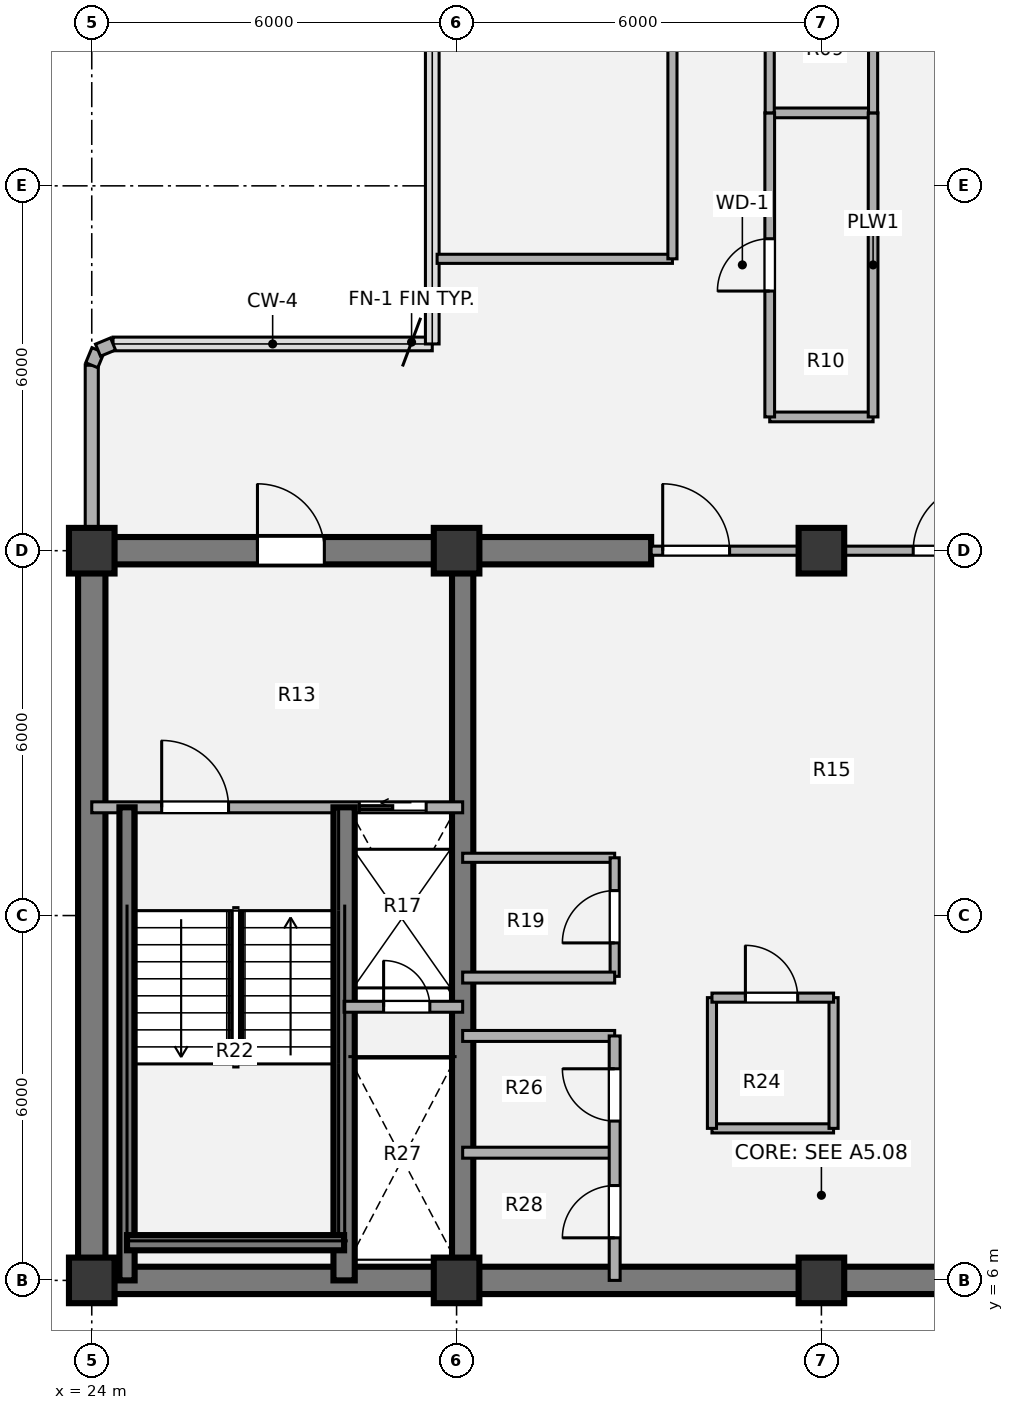
"""IFC4 building model, lengths in metres.
Left out: names, types, materials, properties, quantities, classifications, styles, units other than length and angle.
Written with IfcOpenShell. Run it as: python <this file> out.ifc"""

import sys

from ifc_helpers import new_model, si_unit, direction, frame, frame_2d, origin, origin_2d, place, context, subcontext, project, spatial, rectangle, extrude, source, transform, mapped, element, fill, save


model = new_model("IFC4")
c1 = context("Model", 3, precision=1e-05, world=origin(), true_north=direction((0.0, 1.0)))
c2 = subcontext(c1, "Body", "Model", "MODEL_VIEW")
j1 = project(units=[si_unit("LENGTHUNIT", "METRE"), si_unit("PLANEANGLEUNIT", "RADIAN")], contexts=[c1])
p1 = place(None, origin())
s1 = spatial("IfcSite", under=j1, at=p1, CompositionType="ELEMENT")
p2 = place(p1, origin())
s2 = spatial("IfcBuilding", under=s1, at=p2, CompositionType="ELEMENT")
p3 = place(p2, frame((0.0, 0.0, 190.44)))
s3 = spatial("IfcBuildingStorey", under=s2, at=p3, CompositionType="ELEMENT", Elevation=190.44)
m1 = source(origin(), c2, "Body", "SweptSolid", [
    extrude(rectangle(XDim=0.75, YDim=0.75, at=origin_2d()), origin(), (0.0, 0.0, 1.0), 3.78),
])
for number, where, z_axis, x_axis in (
    (1, (24.0, 6.0, 0.0), (0.0, 0.0, 1.0), (1.0, 0.0, 0.0)),
    (2, (30.0, 6.0, 0.0), (0.0, 0.0, 1.0), (1.0, 0.0, 0.0)),
    (3, (36.0, 6.0, 0.0), (0.0, 0.0, 1.0), (1.0, 0.0, 0.0)),
    (4, (24.0, 18.0, 0.0), (0.0, 0.0, 1.0), (1.0, 0.0, 0.0)),
    (5, (30.0, 18.0, 0.0), (0.0, 0.0, 1.0), (1.0, 0.0, 0.0)),
    (6, (36.0, 18.0, 0.0), (0.0, 0.0, 1.0), (1.0, 0.0, 0.0)),
):
    element("IfcColumn", number, at=place(p3, frame(where, z_axis=z_axis, x_axis=x_axis)), inside=s3, PredefinedType="COLUMN", context=c2, shape_type="MappedRepresentation", body=[
        mapped(m1, transform((0.0, 0.0, 0.0), x_axis=(1.0, 0.0, 0.0), y_axis=(0.0, 1.0, 0.0), z_axis=(0.0, 0.0, 1.0), scale=1.0)),
    ])
p4 = place(p3, frame((48.225, 6.0, 0.0), z_axis=(0.0, 0.0, 1.0), x_axis=(-1.0, 0.0, 0.0)))
e7 = element("IfcWall", 7, at=p4, inside=s3, PredefinedType="SHEAR", context=c2, shape_type="SweptSolid", body=[
    extrude(rectangle(XDim=24.45, YDim=0.45, at=frame_2d((12.225, 0.0))), origin(), (0.0, 0.0, 1.0), 3.78),
])
p5 = place(p3, frame((24.0, 6.0, 0.0), z_axis=(0.0, 0.0, 1.0), x_axis=(0.0, 1.0, 0.0)))
e8 = element("IfcWall", 8, at=p5, inside=s3, PredefinedType="SHEAR", context=c2, shape_type="SweptSolid", body=[
    extrude(rectangle(XDim=12.0, YDim=0.45, at=frame_2d((6.0, 0.0))), origin(), (0.0, 0.0, 1.0), 3.78),
])
p6 = place(p3, frame((23.775, 18.0, 0.0), z_axis=(0.0, 0.0, 1.0), x_axis=(1.0, 0.0, 0.0)))
e9 = element("IfcWall", 9, at=p6, inside=s3, PredefinedType="SHEAR", context=c2, shape_type="SweptSolid", body=[
    extrude(rectangle(XDim=9.425, YDim=0.45, at=frame_2d((4.712, 0.0))), origin(), (0.0, 0.0, 1.0), 3.78),
])
p7 = place(p6, frame((2.95, 0.0, 0.0)))
e10 = element("IfcOpeningElement", 10, at=p7, cuts=e9, PredefinedType="OPENING", context=c2, shape_type="SweptSolid", body=[
    extrude(rectangle(XDim=1.1, YDim=2.1, at=origin_2d()), frame((0.55, 0.235, 1.05), z_axis=(0.0, -1.0, 0.0), x_axis=(1.0, 0.0, 0.0)), (0.0, 0.0, 1.0), 0.47),
])
p8 = place(p3, frame((30.1, 6.0, 0.0), z_axis=(0.0, 0.0, 1.0), x_axis=(0.0, 1.0, 0.0)))
e11 = element("IfcWall", 11, at=p8, inside=s3, PredefinedType="SHEAR", context=c2, shape_type="SweptSolid", body=[
    extrude(rectangle(XDim=12.0, YDim=0.35, at=frame_2d((6.0, 0.0))), origin(), (0.0, 0.0, 1.0), 3.78),
])
p9 = place(p3, frame((24.0, 18.355, 0.0), z_axis=(0.0, 0.0, 1.0), x_axis=(0.0, 1.0, 0.0)))
e12 = element("IfcWall", 12, at=p9, inside=s3, PredefinedType="SOLIDWALL", context=c2, shape_type="SweptSolid", body=[
    extrude(rectangle(XDim=2.695, YDim=0.215, at=frame_2d((1.348, 0.0))), origin(), (0.0, 0.0, 1.0), 2.718),
])
p10 = place(p3, frame((24.0, 21.05, 0.0), z_axis=(0.0, 0.0, 1.0), x_axis=(0.382673670509, 0.923883575944, 0.0)))
e13 = element("IfcWall", 13, at=p10, inside=s3, PredefinedType="SOLIDWALL", context=c2, shape_type="SweptSolid", body=[
    extrude(rectangle(XDim=0.268, YDim=0.215, at=frame_2d((0.134, 0.0))), origin(), (0.0, 0.0, 1.0), 3.53),
])
p11 = place(p3, frame((24.103, 21.298, 0.0), z_axis=(0.0, 0.0, 1.0), x_axis=(0.924205486139, 0.381895560841, 0.0)))
e14 = element("IfcWall", 14, at=p11, inside=s3, PredefinedType="SOLIDWALL", context=c2, shape_type="SweptSolid", body=[
    extrude(rectangle(XDim=0.268, YDim=0.215, at=frame_2d((0.134, 0.0))), origin(), (0.0, 0.0, 1.0), 3.53),
])
p12 = place(p3, frame((30.1, 12.95, 0.0), z_axis=(0.0, 0.0, 1.0), x_axis=(1.0, 0.0, 0.0)))
e15 = element("IfcWall", 15, at=p12, inside=s3, PredefinedType="PARTITIONING", context=c2, shape_type="SweptSolid", body=[
    extrude(rectangle(XDim=2.5, YDim=0.15, at=frame_2d((1.25, 0.0))), origin(), (0.0, 0.0, 1.0), 3.5),
])
p13 = place(p3, frame((32.6, 11.0, 0.0), z_axis=(0.0, 0.0, 1.0), x_axis=(0.0, 1.0, 0.0)))
e16 = element("IfcWall", 16, at=p13, inside=s3, PredefinedType="PARTITIONING", context=c2, shape_type="SweptSolid", body=[
    extrude(rectangle(XDim=1.95, YDim=0.15, at=frame_2d((0.975, 0.0))), origin(), (0.0, 0.0, 1.0), 3.5),
])
p14 = place(p13, frame((0.55, 0.0, 0.0)))
e17 = element("IfcOpeningElement", 17, at=p14, cuts=e16, PredefinedType="OPENING", context=c2, shape_type="SweptSolid", body=[
    extrude(rectangle(XDim=0.86, YDim=2.1, at=origin_2d()), frame((0.43, 0.085, 1.05), z_axis=(0.0, -1.0, 0.0), x_axis=(1.0, 0.0, 0.0)), (0.0, 0.0, 1.0), 0.17),
])
p15 = place(p3, frame((34.2, 8.5, 0.0), z_axis=(0.0, 0.0, 1.0), x_axis=(1.0, 0.0, 0.0)))
e18 = element("IfcWall", 18, at=p15, inside=s3, PredefinedType="PARTITIONING", context=c2, shape_type="SweptSolid", body=[
    extrude(rectangle(XDim=2.0, YDim=0.15, at=frame_2d((1.0, 0.0))), origin(), (0.0, 0.0, 1.0), 3.5),
])
p16 = place(p3, frame((34.2, 8.5, 0.0), z_axis=(0.0, 0.0, 1.0), x_axis=(0.0, 1.0, 0.0)))
e19 = element("IfcWall", 19, at=p16, inside=s3, PredefinedType="PARTITIONING", context=c2, shape_type="SweptSolid", body=[
    extrude(rectangle(XDim=2.15, YDim=0.15, at=frame_2d((1.075, 0.0))), origin(), (0.0, 0.0, 1.0), 3.5),
])
p17 = place(p3, frame((36.2, 8.5, 0.0), z_axis=(0.0, 0.0, 1.0), x_axis=(0.0, 1.0, 0.0)))
e20 = element("IfcWall", 20, at=p17, inside=s3, PredefinedType="PARTITIONING", context=c2, shape_type="SweptSolid", body=[
    extrude(rectangle(XDim=2.15, YDim=0.15, at=frame_2d((1.075, 0.0))), origin(), (0.0, 0.0, 1.0), 2.715),
])
p18 = place(p3, frame((34.2, 10.65, 0.0), z_axis=(0.0, 0.0, 1.0), x_axis=(1.0, 0.0, 0.0)))
e21 = element("IfcWall", 21, at=p18, inside=s3, PredefinedType="PARTITIONING", context=c2, shape_type="SweptSolid", body=[
    extrude(rectangle(XDim=2.0, YDim=0.15, at=frame_2d((1.0, 0.0))), origin(), (0.0, 0.0, 1.0), 3.5),
])
p19 = place(p18, frame((0.55, 0.0, 0.0)))
e22 = element("IfcOpeningElement", 22, at=p19, cuts=e21, PredefinedType="OPENING", context=c2, shape_type="SweptSolid", body=[
    extrude(rectangle(XDim=0.86, YDim=2.1, at=origin_2d()), frame((0.43, 0.085, 1.05), z_axis=(0.0, -1.0, 0.0), x_axis=(1.0, 0.0, 0.0)), (0.0, 0.0, 1.0), 0.17),
])
for number, where, z_axis, x_axis in (
    (23, (30.1, 10.98, 0.0), (0.0, 0.0, 1.0), (1.0, 0.0, 0.0)),
    (24, (30.1, 8.1, 0.0), (0.0, 0.0, 1.0), (1.0, 0.0, 0.0)),
    (25, (30.1, 10.02, 0.0), (0.0, 0.0, 1.0), (1.0, 0.0, 0.0)),
):
    element("IfcWall", number, at=place(p3, frame(where, z_axis=z_axis, x_axis=x_axis)), inside=s3, PredefinedType="PARTITIONING", context=c2, shape_type="SweptSolid", body=[
        extrude(rectangle(XDim=2.5, YDim=0.18, at=frame_2d((1.25, 0.0))), origin(), (0.0, 0.0, 1.0), 3.5),
    ])
p20 = place(p3, frame((32.6, 6.0, 0.0), z_axis=(0.0, 0.0, 1.0), x_axis=(0.0, 1.0, 0.0)))
e26 = element("IfcWall", 26, at=p20, inside=s3, PredefinedType="PARTITIONING", context=c2, shape_type="SweptSolid", body=[
    extrude(rectangle(XDim=4.02, YDim=0.18, at=frame_2d((2.01, 0.0))), origin(), (0.0, 0.0, 1.0), 3.5),
])
p21 = place(p20, frame((0.7, 0.0, 0.0)))
e27 = element("IfcOpeningElement", 27, at=p21, cuts=e26, PredefinedType="OPENING", context=c2, shape_type="SweptSolid", body=[
    extrude(rectangle(XDim=0.86, YDim=2.1, at=origin_2d()), frame((0.43, 0.1, 1.05), z_axis=(0.0, -1.0, 0.0), x_axis=(1.0, 0.0, 0.0)), (0.0, 0.0, 1.0), 0.2),
])
p22 = place(p20, frame((2.62, 0.0, 0.0)))
e28 = element("IfcOpeningElement", 28, at=p22, cuts=e26, PredefinedType="OPENING", context=c2, shape_type="SweptSolid", body=[
    extrude(rectangle(XDim=0.86, YDim=2.1, at=origin_2d()), frame((0.43, 0.1, 1.05), z_axis=(0.0, -1.0, 0.0), x_axis=(1.0, 0.0, 0.0)), (0.0, 0.0, 1.0), 0.2),
])
p23 = place(p3, frame((33.2, 18.0, 0.0), z_axis=(0.0, 0.0, 1.0), x_axis=(1.0, 0.0, 0.0)))
e29 = element("IfcWall", 29, at=p23, inside=s3, PredefinedType="PARTITIONING", context=c2, shape_type="SweptSolid", body=[
    extrude(rectangle(XDim=5.6, YDim=0.15, at=frame_2d((2.8, 0.0))), origin(), (0.0, 0.0, 1.0), 2.515),
])
p24 = place(p23, frame((0.19, 0.0, 0.0)))
e30 = element("IfcOpeningElement", 30, at=p24, cuts=e29, PredefinedType="OPENING", context=c2, shape_type="SweptSolid", body=[
    extrude(rectangle(XDim=1.1, YDim=2.1, at=origin_2d()), frame((0.55, 0.085, 1.05), z_axis=(0.0, -1.0, 0.0), x_axis=(1.0, 0.0, 0.0)), (0.0, 0.0, 1.0), 0.17),
])
p25 = place(p23, frame((4.31, 0.0, 0.0)))
e31 = element("IfcOpeningElement", 31, at=p25, cuts=e29, PredefinedType="OPENING", context=c2, shape_type="SweptSolid", body=[
    extrude(rectangle(XDim=1.1, YDim=2.1, at=origin_2d()), frame((0.55, 0.085, 1.05), z_axis=(0.0, -1.0, 0.0), x_axis=(1.0, 0.0, 0.0)), (0.0, 0.0, 1.0), 0.17),
])
p26 = place(p3, frame((24.0, 13.78, 0.0), z_axis=(0.0, 0.0, 1.0), x_axis=(1.0, 0.0, 0.0)))
e32 = element("IfcWall", 32, at=p26, inside=s3, PredefinedType="PARTITIONING", context=c2, shape_type="SweptSolid", body=[
    extrude(rectangle(XDim=6.1, YDim=0.18, at=frame_2d((3.05, 0.0))), origin(), (0.0, 0.0, 1.0), 3.5),
])
p27 = place(p26, frame((1.15, 0.0, 0.0)))
e33 = element("IfcOpeningElement", 33, at=p27, cuts=e32, PredefinedType="OPENING", context=c2, shape_type="SweptSolid", body=[
    extrude(rectangle(XDim=1.1, YDim=2.1, at=origin_2d()), frame((0.55, 0.1, 1.05), z_axis=(0.0, -1.0, 0.0), x_axis=(1.0, 0.0, 0.0)), (0.0, 0.0, 1.0), 0.2),
])
p28 = place(p26, frame((4.4, 0.0, 0.0)))
e34 = element("IfcOpeningElement", 34, at=p28, cuts=e32, PredefinedType="OPENING", context=c2, shape_type="SweptSolid", body=[
    extrude(rectangle(XDim=1.1, YDim=2.1, at=origin_2d()), frame((0.55, 0.1, 1.05), z_axis=(0.0, -1.0, 0.0), x_axis=(1.0, 0.0, 0.0)), (0.0, 0.0, 1.0), 0.2),
])
p29 = place(p3, frame((28.15, 6.0, 0.0), z_axis=(0.0, 0.0, 1.0), x_axis=(0.0, 1.0, 0.0)))
e35 = element("IfcWall", 35, at=p29, inside=s3, PredefinedType="SHEAR", context=c2, shape_type="SweptSolid", body=[
    extrude(rectangle(XDim=7.78, YDim=0.35, at=frame_2d((3.89, 0.0))), origin(), (0.0, 0.0, 1.0), 3.85),
])
p30 = place(p3, frame((24.58, 6.0, 0.0), z_axis=(0.0, 0.0, 1.0), x_axis=(0.0, 1.0, 0.0)))
e36 = element("IfcWall", 36, at=p30, inside=s3, PredefinedType="SHEAR", context=c2, shape_type="SweptSolid", body=[
    extrude(rectangle(XDim=7.78, YDim=0.25, at=frame_2d((3.89, 0.0))), origin(), (0.0, 0.0, 1.0), 3.85),
])
p31 = place(p3, frame((24.58, 6.62, 0.0), z_axis=(0.0, 0.0, 1.0), x_axis=(1.0, 0.0, 0.0)))
e37 = element("IfcWall", 37, at=p31, inside=s3, PredefinedType="SHEAR", context=c2, shape_type="SweptSolid", body=[
    extrude(rectangle(XDim=3.57, YDim=0.25, at=frame_2d((1.785, 0.0))), origin(), (0.0, 0.0, 1.0), 3.85),
])
p32 = place(p3, frame((28.15, 10.5, 0.0), z_axis=(0.0, 0.0, 1.0), x_axis=(1.0, 0.0, 0.0)))
e38 = element("IfcWall", 38, at=p32, inside=s3, PredefinedType="PARTITIONING", context=c2, shape_type="SweptSolid", body=[
    extrude(rectangle(XDim=1.95, YDim=0.18, at=frame_2d((0.975, 0.0))), origin(), (0.0, 0.0, 1.0), 3.5),
])
p33 = place(p32, frame((0.65, 0.0, 0.0)))
e39 = element("IfcOpeningElement", 39, at=p33, cuts=e38, PredefinedType="OPENING", context=c2, shape_type="SweptSolid", body=[
    extrude(rectangle(XDim=0.76, YDim=2.05, at=origin_2d()), frame((0.38, 0.1, 1.025), z_axis=(0.0, -1.0, 0.0), x_axis=(1.0, 0.0, 0.0)), (0.0, 0.0, 1.0), 0.2),
])
p34 = place(p3, frame((35.15, 20.2, 0.0), z_axis=(0.0, 0.0, 1.0), x_axis=(1.0, 0.0, 0.0)))
e40 = element("IfcWall", 40, at=p34, inside=s3, PredefinedType="PLUMBINGWALL", context=c2, shape_type="SweptSolid", body=[
    extrude(rectangle(XDim=1.7, YDim=0.16, at=frame_2d((0.85, 0.0))), origin(), (0.0, 0.0, 1.0), 3.5),
])
p35 = place(p3, frame((29.68, 22.8, 0.0), z_axis=(0.0, 0.0, 1.0), x_axis=(1.0, 0.0, 0.0)))
e41 = element("IfcWall", 41, at=p35, inside=s3, PredefinedType="PARTITIONING", context=c2, shape_type="SweptSolid", body=[
    extrude(rectangle(XDim=3.87, YDim=0.15, at=frame_2d((1.935, 0.0))), origin(), (0.0, 0.0, 1.0), 3.5),
])
p36 = place(p3, frame((35.15, 25.2, 0.0), z_axis=(0.0, 0.0, 1.0), x_axis=(1.0, 0.0, 0.0)))
e42 = element("IfcWall", 42, at=p36, inside=s3, PredefinedType="PLUMBINGWALL", context=c2, shape_type="SweptSolid", body=[
    extrude(rectangle(XDim=1.7, YDim=0.16, at=frame_2d((0.85, 0.0))), origin(), (0.0, 0.0, 1.0), 3.5),
])
p37 = place(p3, frame((33.55, 22.8, 0.0), z_axis=(0.0, 0.0, 1.0), x_axis=(0.0, 1.0, 0.0)))
e43 = element("IfcWall", 43, at=p37, inside=s3, PredefinedType="PARTITIONING", context=c2, shape_type="SweptSolid", body=[
    extrude(rectangle(XDim=9.8, YDim=0.15, at=frame_2d((4.9, 0.0))), origin(), (0.0, 0.0, 1.0), 3.5),
])
p38 = place(p37, frame((4.34, 0.0, 0.0)))
e44 = element("IfcOpeningElement", 44, at=p38, cuts=e43, PredefinedType="OPENING", context=c2, shape_type="SweptSolid", body=[
    extrude(rectangle(XDim=0.86, YDim=2.1, at=origin_2d()), frame((0.43, 0.085, 1.05), z_axis=(0.0, -1.0, 0.0), x_axis=(1.0, 0.0, 0.0)), (0.0, 0.0, 1.0), 0.17),
])
p39 = place(p3, frame((35.15, 20.2, 0.0), z_axis=(0.0, 0.0, 1.0), x_axis=(0.0, 1.0, 0.0)))
e45 = element("IfcWall", 45, at=p39, inside=s3, PredefinedType="PLUMBINGWALL", context=c2, shape_type="SweptSolid", body=[
    extrude(rectangle(XDim=5.0, YDim=0.16, at=frame_2d((2.5, 0.0))), origin(), (0.0, 0.0, 1.0), 3.5),
])
p40 = place(p39, frame((2.07, 0.0, 0.0)))
e46 = element("IfcOpeningElement", 46, at=p40, cuts=e45, PredefinedType="OPENING", context=c2, shape_type="SweptSolid", body=[
    extrude(rectangle(XDim=0.86, YDim=2.1, at=origin_2d()), frame((0.43, 0.09, 1.05), z_axis=(0.0, -1.0, 0.0), x_axis=(1.0, 0.0, 0.0)), (0.0, 0.0, 1.0), 0.18),
])
p41 = place(p3, frame((35.15, 25.2, 0.0), z_axis=(0.0, 0.0, 1.0), x_axis=(0.0, 1.0, 0.0)))
e47 = element("IfcWall", 47, at=p41, inside=s3, PredefinedType="PARTITIONING", context=c2, shape_type="SweptSolid", body=[
    extrude(rectangle(XDim=15.46, YDim=0.15, at=frame_2d((7.73, 0.0))), origin(), (0.0, 0.0, 1.0), 3.5),
])
p42 = place(p3, frame((36.85, 20.2, 0.0), z_axis=(0.0, 0.0, 1.0), x_axis=(0.0, 1.0, 0.0)))
e48 = element("IfcWall", 48, at=p42, inside=s3, PredefinedType="PLUMBINGWALL", context=c2, shape_type="SweptSolid", body=[
    extrude(rectangle(XDim=5.0, YDim=0.16, at=frame_2d((2.5, 0.0))), origin(), (0.0, 0.0, 1.0), 3.5),
])
p43 = place(p3, frame((36.85, 25.2, 0.0), z_axis=(0.0, 0.0, 1.0), x_axis=(0.0, 1.0, 0.0)))
e49 = element("IfcWall", 49, at=p43, inside=s3, PredefinedType="PARTITIONING", context=c2, shape_type="SweptSolid", body=[
    extrude(rectangle(XDim=15.46, YDim=0.15, at=frame_2d((7.73, 0.0))), origin(), (0.0, 0.0, 1.0), 3.5),
])
p44 = place(p43, frame((7.205, 0.0, 0.0)))
e50 = element("IfcOpeningElement", 50, at=p44, cuts=e49, PredefinedType="OPENING", context=c2, shape_type="SweptSolid", body=[
    extrude(rectangle(XDim=1.05, YDim=2.1, at=origin_2d()), frame((0.525, 0.085, 1.05), z_axis=(0.0, -1.0, 0.0), x_axis=(1.0, 0.0, 0.0)), (0.0, 0.0, 1.0), 0.17),
])
m2 = source(origin(), c2, "Body", "SweptSolid", [
    extrude(rectangle(XDim=0.86, YDim=2.1, at=origin_2d()), frame((0.43, 0.025, 1.05), z_axis=(0.0, -1.0, 0.0), x_axis=(1.0, 0.0, 0.0)), (0.0, 0.0, 1.0), 0.05),
])
p45 = place(p14, origin())
e51 = element("IfcDoor", 51, at=p45, inside=s3, OperationType="SINGLE_SWING_LEFT", PredefinedType="DOOR", context=c2, shape_type="MappedRepresentation", body=[
    mapped(m2, transform((0.0, 0.0, 0.0), x_axis=(1.0, 0.0, 0.0), y_axis=(0.0, 1.0, 0.0), z_axis=(0.0, 0.0, 1.0), scale=1.0)),
])
fill(e17, e51)
p46 = place(p19, origin())
e52 = element("IfcDoor", 52, at=p46, inside=s3, OperationType="SINGLE_SWING_LEFT", PredefinedType="DOOR", context=c2, shape_type="MappedRepresentation", body=[
    mapped(m2, transform((0.0, 0.0, 0.0), x_axis=(1.0, 0.0, 0.0), y_axis=(0.0, 1.0, 0.0), z_axis=(0.0, 0.0, 1.0), scale=1.0)),
])
fill(e22, e52)
p47 = place(p21, origin())
e53 = element("IfcDoor", 53, at=p47, inside=s3, OperationType="SINGLE_SWING_LEFT", PredefinedType="DOOR", context=c2, shape_type="MappedRepresentation", body=[
    mapped(m2, transform((0.0, 0.0, 0.0), x_axis=(1.0, 0.0, 0.0), y_axis=(0.0, 1.0, 0.0), z_axis=(0.0, 0.0, 1.0), scale=1.0)),
])
fill(e27, e53)
p48 = place(p22, origin())
e54 = element("IfcDoor", 54, at=p48, inside=s3, OperationType="SINGLE_SWING_RIGHT", PredefinedType="DOOR", context=c2, shape_type="MappedRepresentation", body=[
    mapped(m2, transform((0.0, 0.0, 0.0), x_axis=(1.0, 0.0, 0.0), y_axis=(0.0, 1.0, 0.0), z_axis=(0.0, 0.0, 1.0), scale=1.0)),
])
fill(e28, e54)
m3 = source(origin(), c2, "Body", "SweptSolid", [
    extrude(rectangle(XDim=1.1, YDim=2.1, at=origin_2d()), frame((0.55, 0.025, 1.05), z_axis=(0.0, -1.0, 0.0), x_axis=(1.0, 0.0, 0.0)), (0.0, 0.0, 1.0), 0.05),
])
p49 = place(p24, origin())
e55 = element("IfcDoor", 55, at=p49, inside=s3, OperationType="SINGLE_SWING_LEFT", PredefinedType="DOOR", context=c2, shape_type="MappedRepresentation", body=[
    mapped(m3, transform((0.0, 0.0, 0.0), x_axis=(1.0, 0.0, 0.0), y_axis=(0.0, 1.0, 0.0), z_axis=(0.0, 0.0, 1.0), scale=1.0)),
])
fill(e30, e55)
p50 = place(p25, origin())
e56 = element("IfcDoor", 56, at=p50, inside=s3, OperationType="SINGLE_SWING_RIGHT", PredefinedType="DOOR", context=c2, shape_type="MappedRepresentation", body=[
    mapped(m3, transform((0.0, 0.0, 0.0), x_axis=(1.0, 0.0, 0.0), y_axis=(0.0, 1.0, 0.0), z_axis=(0.0, 0.0, 1.0), scale=1.0)),
])
fill(e31, e56)
m4 = source(origin(), c2, "Body", "SweptSolid", [
    extrude(rectangle(XDim=1.1, YDim=2.1, at=origin_2d()), frame((0.55, 0.025, 1.05), z_axis=(0.0, -1.0, 0.0), x_axis=(1.0, 0.0, 0.0)), (0.0, 0.0, 1.0), 0.05),
])
p51 = place(p27, origin())
e57 = element("IfcDoor", 57, at=p51, inside=s3, OperationType="SINGLE_SWING_LEFT", PredefinedType="DOOR", context=c2, shape_type="MappedRepresentation", body=[
    mapped(m4, transform((0.0, 0.0, 0.0), x_axis=(1.0, 0.0, 0.0), y_axis=(0.0, 1.0, 0.0), z_axis=(0.0, 0.0, 1.0), scale=1.0)),
])
fill(e33, e57)
m5 = source(origin(), c2, "Body", "SweptSolid", [
    extrude(rectangle(XDim=1.1, YDim=2.1, at=origin_2d()), frame((0.55, 0.025, 1.05), z_axis=(0.0, -1.0, 0.0), x_axis=(1.0, 0.0, 0.0)), (0.0, 0.0, 1.0), 0.05),
])
p52 = place(p28, origin())
e58 = element("IfcDoor", 58, at=p52, inside=s3, OperationType="SLIDING_TO_LEFT", PredefinedType="DOOR", context=c2, shape_type="MappedRepresentation", body=[
    mapped(m5, transform((0.0, 0.0, 0.0), x_axis=(1.0, 0.0, 0.0), y_axis=(0.0, 1.0, 0.0), z_axis=(0.0, 0.0, 1.0), scale=1.0)),
])
fill(e34, e58)
m6 = source(origin(), c2, "Body", "SweptSolid", [
    extrude(rectangle(XDim=0.76, YDim=2.05, at=origin_2d()), frame((0.38, 0.025, 1.025), z_axis=(0.0, -1.0, 0.0), x_axis=(1.0, 0.0, 0.0)), (0.0, 0.0, 1.0), 0.05),
])
p53 = place(p33, origin())
e59 = element("IfcDoor", 59, at=p53, inside=s3, OperationType="SINGLE_SWING_LEFT", PredefinedType="DOOR", context=c2, shape_type="MappedRepresentation", body=[
    mapped(m6, transform((0.0, 0.0, 0.0), x_axis=(1.0, 0.0, 0.0), y_axis=(0.0, 1.0, 0.0), z_axis=(0.0, 0.0, 1.0), scale=1.0)),
])
fill(e39, e59)
p54 = place(p7, origin())
e60 = element("IfcDoor", 60, at=p54, inside=s3, OperationType="SINGLE_SWING_LEFT", PredefinedType="DOOR", context=c2, shape_type="MappedRepresentation", body=[
    mapped(m3, transform((0.0, 0.0, 0.0), x_axis=(1.0, 0.0, 0.0), y_axis=(0.0, 1.0, 0.0), z_axis=(0.0, 0.0, 1.0), scale=1.0)),
])
fill(e10, e60)
m7 = source(origin(), c2, "Body", "SweptSolid", [
    extrude(rectangle(XDim=0.86, YDim=2.1, at=origin_2d()), frame((0.43, 0.025, 1.05), z_axis=(0.0, -1.0, 0.0), x_axis=(1.0, 0.0, 0.0)), (0.0, 0.0, 1.0), 0.05),
])
p55 = place(p40, origin())
e61 = element("IfcDoor", 61, at=p55, inside=s3, OperationType="SINGLE_SWING_LEFT", PredefinedType="DOOR", context=c2, shape_type="MappedRepresentation", body=[
    mapped(m7, transform((0.0, 0.0, 0.0), x_axis=(1.0, 0.0, 0.0), y_axis=(0.0, 1.0, 0.0), z_axis=(0.0, 0.0, 1.0), scale=1.0)),
])
fill(e46, e61)
save(model, sys.argv[1])
